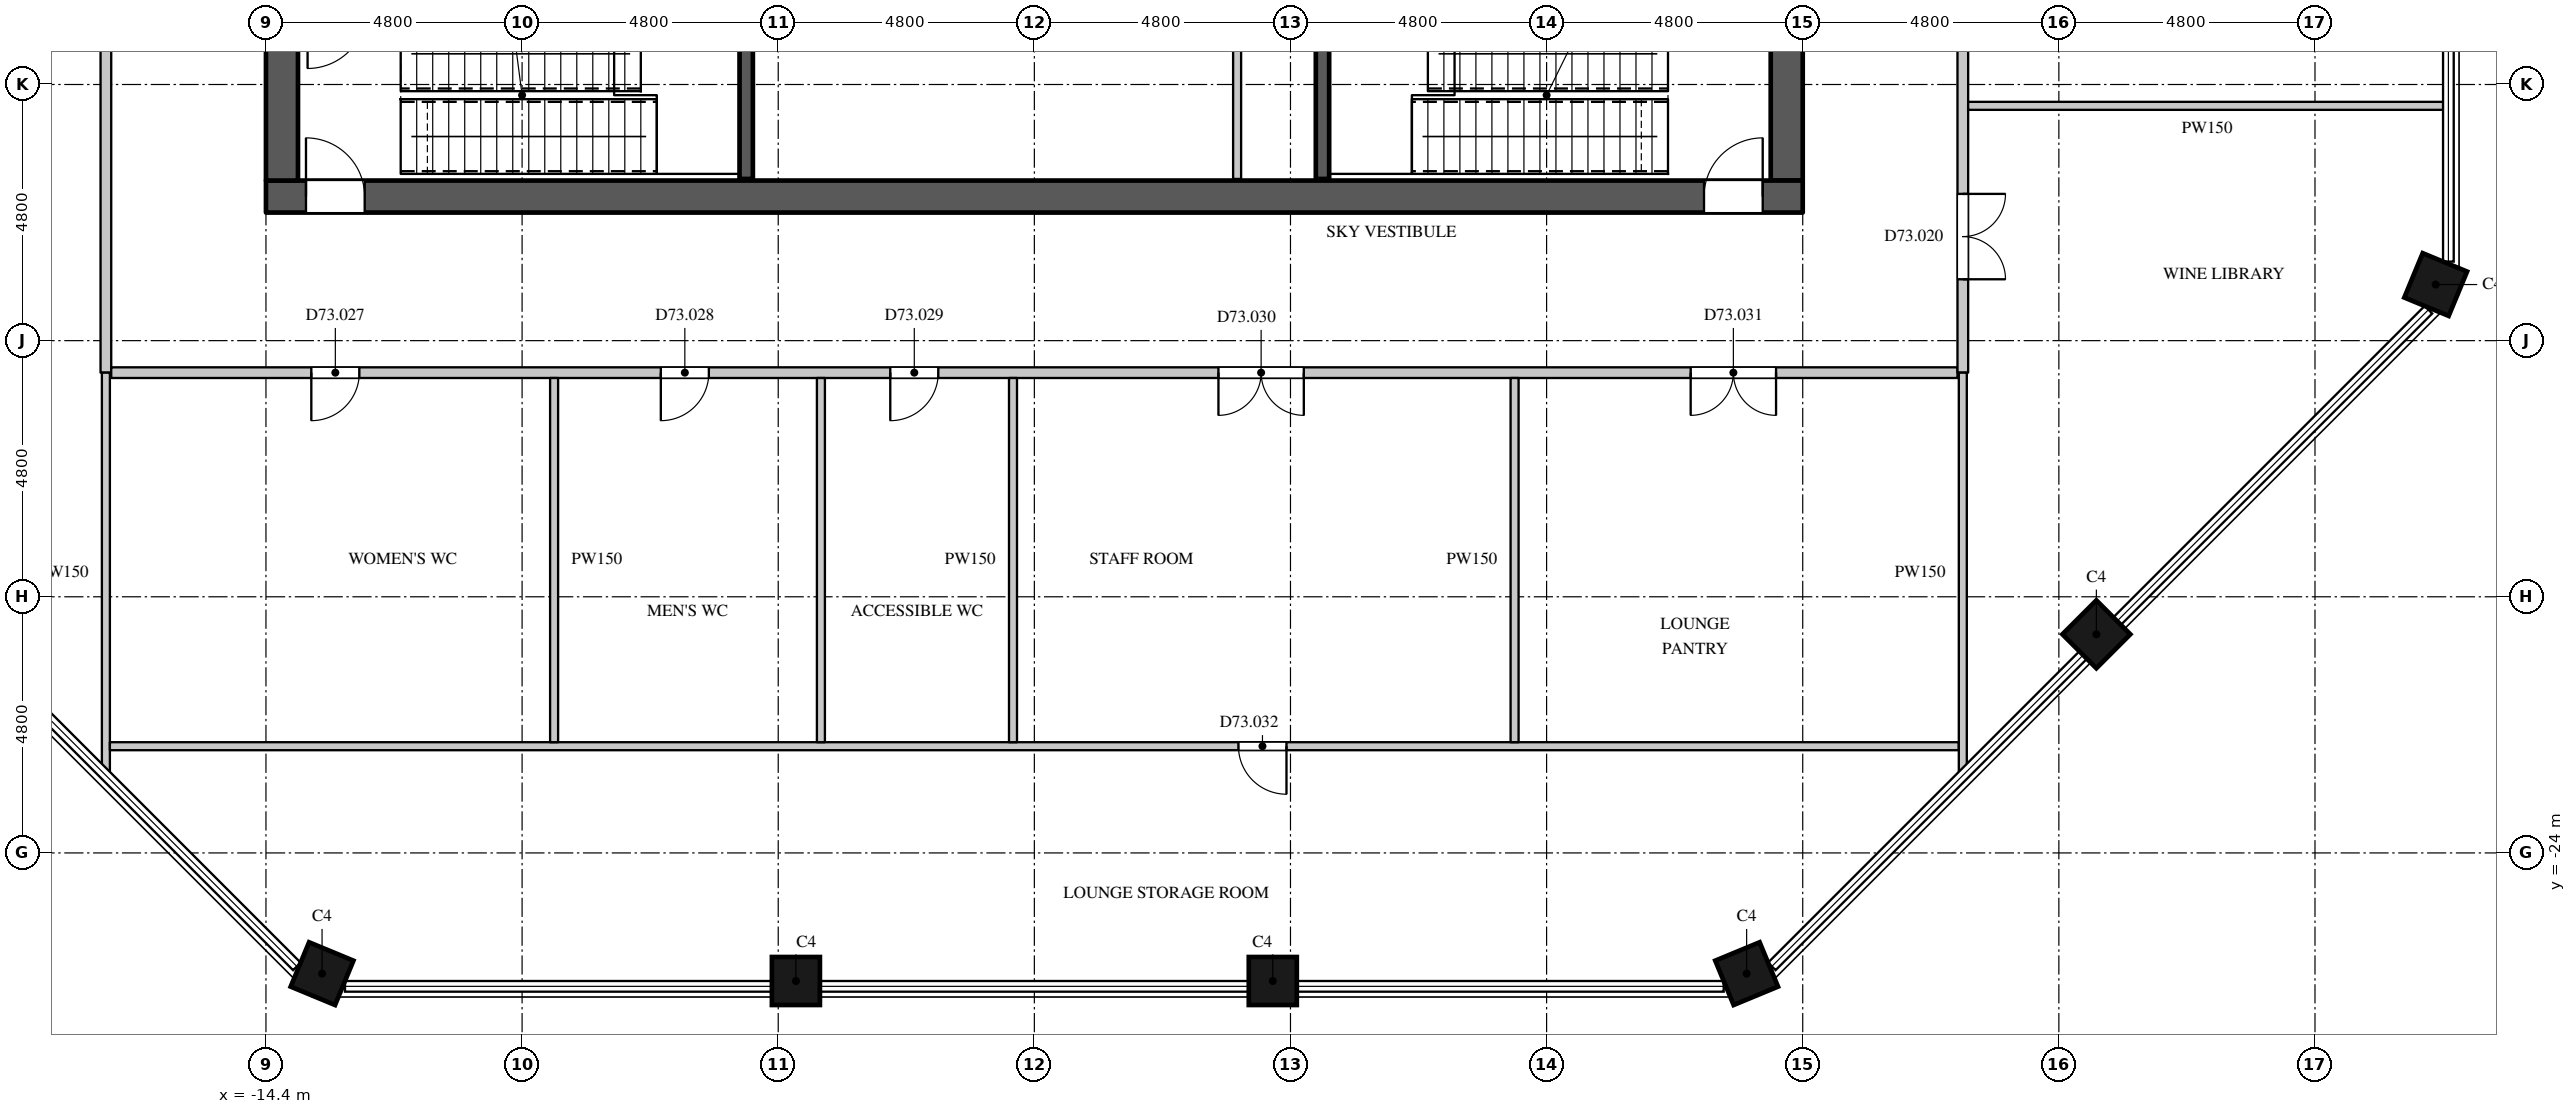
"""IFC4 building model, lengths in metres.
Left out: names, types, materials, properties, quantities, classifications, styles, units other than length and angle.
Written with IfcOpenShell. Run it as: python <this file> out.ifc"""

import sys

from ifc_helpers import new_model, si_unit, direction, frame, frame_2d, origin, origin_2d, place, context, subcontext, project, spatial, rectangle, extrude, element, fill, save


model = new_model("IFC4")
c1 = context("Model", 3, precision=1e-05, world=origin(), true_north=direction((0.0, 1.0)))
c2 = subcontext(c1, "Body", "Model", "MODEL_VIEW")
j1 = project(units=[si_unit("LENGTHUNIT", "METRE"), si_unit("PLANEANGLEUNIT", "RADIAN")], contexts=[c1])
p1 = place(None, origin())
s1 = spatial("IfcSite", under=j1, at=p1, CompositionType="ELEMENT")
p2 = place(p1, origin())
s2 = spatial("IfcBuilding", under=s1, at=p2, CompositionType="ELEMENT")
p3 = place(p2, frame((0.0, 0.0, 314.7)))
s3 = spatial("IfcBuildingStorey", under=s2, at=p3, CompositionType="ELEMENT", Elevation=314.7)
for number, where, z_axis, x_axis in (
    (1, (26.262, -13.349, 0.0), (0.0, 0.0, 1.0), (0.383, 0.924, 0.0)),
    (2, (-13.349, -26.262, 0.0), (0.0, 0.0, 1.0), (0.924, -0.383, 0.0)),
    (3, (-4.469, -26.4, 0.0), (0.0, 0.0, 1.0), (1.0, 0.0, 0.0)),
    (4, (4.469, -26.4, 0.0), (0.0, 0.0, 1.0), (1.0, 0.0, 0.0)),
    (5, (13.349, -26.262, 0.0), (0.0, 0.0, 1.0), (0.924, 0.383, 0.0)),
    (6, (19.903, -19.903, 0.0), (0.0, 0.0, 1.0), (0.707, 0.707, 0.0)),
):
    element("IfcColumn", number, at=place(p3, frame(where, z_axis=z_axis, x_axis=x_axis)), inside=s3, PredefinedType="COLUMN", context=c2, shape_type="SweptSolid", body=[
        extrude(rectangle(XDim=0.9, YDim=0.9, at=origin_2d()), origin(), (0.0, 0.0, 1.0), 5.4),
    ])
p4 = place(p3, frame((-14.4, -11.7, 0.0), z_axis=(0.0, 0.0, 1.0), x_axis=(1.0, 0.0, 0.0)))
e7 = element("IfcWall", 7, at=p4, inside=s3, PredefinedType="SHEAR", context=c2, shape_type="SweptSolid", body=[
    extrude(rectangle(XDim=28.8, YDim=0.6, at=frame_2d((14.4, 0.0))), origin(), (0.0, 0.0, 1.0), 5.4),
])
p5 = place(p4, frame((0.75, 0.0, 0.0)))
e8 = element("IfcOpeningElement", 8, at=p5, cuts=e7, PredefinedType="OPENING", context=c2, shape_type="SweptSolid", body=[
    extrude(rectangle(XDim=1.1, YDim=2.2, at=frame_2d((0.55, 1.1))), frame((0.0, 0.31, 0.0), z_axis=(0.0, -1.0, 0.0), x_axis=(1.0, 0.0, 0.0)), (0.0, 0.0, 1.0), 0.62),
])
p6 = place(p4, frame((26.95, 0.0, 0.0)))
e9 = element("IfcOpeningElement", 9, at=p6, cuts=e7, PredefinedType="OPENING", context=c2, shape_type="SweptSolid", body=[
    extrude(rectangle(XDim=1.1, YDim=2.2, at=frame_2d((0.55, 1.1))), frame((0.0, 0.31, 0.0), z_axis=(0.0, -1.0, 0.0), x_axis=(1.0, 0.0, 0.0)), (0.0, 0.0, 1.0), 0.62),
])
p7 = place(p3, frame((14.1, -11.4, 0.0), z_axis=(0.0, 0.0, 1.0), x_axis=(0.0, 1.0, 0.0)))
e10 = element("IfcWall", 10, at=p7, inside=s3, PredefinedType="SHEAR", context=c2, shape_type="SweptSolid", body=[
    extrude(rectangle(XDim=22.8, YDim=0.6, at=frame_2d((11.4, 0.0))), origin(), (0.0, 0.0, 1.0), 5.4),
])
p8 = place(p7, frame((6.35, 0.0, 0.0)))
e11 = element("IfcOpeningElement", 11, at=p8, cuts=e10, PredefinedType="OPENING", context=c2, shape_type="SweptSolid", body=[
    extrude(rectangle(XDim=1.5, YDim=2.4, at=frame_2d((0.75, 1.2))), frame((0.0, 0.31, 0.0), z_axis=(0.0, -1.0, 0.0), x_axis=(1.0, 0.0, 0.0)), (0.0, 0.0, 1.0), 0.62),
])
p9 = place(p3, frame((-14.1, -11.4, 0.0), z_axis=(0.0, 0.0, 1.0), x_axis=(0.0, 1.0, 0.0)))
e12 = element("IfcWall", 12, at=p9, inside=s3, PredefinedType="SHEAR", context=c2, shape_type="SweptSolid", body=[
    extrude(rectangle(XDim=22.8, YDim=0.6, at=frame_2d((11.4, 0.0))), origin(), (0.0, 0.0, 1.0), 5.4),
])
p10 = place(p9, frame((16.1, 0.0, 0.0)))
e13 = element("IfcOpeningElement", 13, at=p10, cuts=e12, PredefinedType="OPENING", context=c2, shape_type="SweptSolid", body=[
    extrude(rectangle(XDim=1.5, YDim=2.4, at=frame_2d((0.75, 1.2))), frame((0.0, 0.31, 0.0), z_axis=(0.0, -1.0, 0.0), x_axis=(1.0, 0.0, 0.0)), (0.0, 0.0, 1.0), 0.62),
])
p11 = place(p9, frame((5.1, 0.0, 0.0)))
e14 = element("IfcOpeningElement", 14, at=p11, cuts=e12, PredefinedType="OPENING", context=c2, shape_type="SweptSolid", body=[
    extrude(rectangle(XDim=1.5, YDim=2.4, at=frame_2d((0.75, 1.2))), frame((0.0, 0.31, 0.0), z_axis=(0.0, -1.0, 0.0), x_axis=(1.0, 0.0, 0.0)), (0.0, 0.0, 1.0), 0.62),
])
p12 = place(p3, frame((-17.4, -15.0, 0.0), z_axis=(0.0, 0.0, 1.0), x_axis=(0.0, 1.0, 0.0)))
e15 = element("IfcWall", 15, at=p12, inside=s3, PredefinedType="PARTITIONING", context=c2, shape_type="SweptSolid", body=[
    extrude(rectangle(XDim=30.0, YDim=0.2, at=frame_2d((15.0, 0.0))), origin(), (0.0, 0.0, 1.0), 5.1),
])
p13 = place(p12, frame((6.75, 0.0, 0.0)))
e16 = element("IfcOpeningElement", 16, at=p13, cuts=e15, PredefinedType="OPENING", context=c2, shape_type="SweptSolid", body=[
    extrude(rectangle(XDim=1.6, YDim=2.4, at=frame_2d((0.8, 1.2))), frame((0.0, 0.11, 0.0), z_axis=(0.0, -1.0, 0.0), x_axis=(1.0, 0.0, 0.0)), (0.0, 0.0, 1.0), 0.22),
])
p14 = place(p12, frame((21.6, 0.0, 0.0)))
e17 = element("IfcOpeningElement", 17, at=p14, cuts=e15, PredefinedType="OPENING", context=c2, shape_type="SweptSolid", body=[
    extrude(rectangle(XDim=1.6, YDim=2.4, at=frame_2d((0.8, 1.2))), frame((0.0, 0.11, 0.0), z_axis=(0.0, -1.0, 0.0), x_axis=(1.0, 0.0, 0.0)), (0.0, 0.0, 1.0), 0.22),
])
p15 = place(p3, frame((-17.3, -15.0, 0.0), z_axis=(0.0, 0.0, 1.0), x_axis=(1.0, 0.0, 0.0)))
e18 = element("IfcWall", 18, at=p15, inside=s3, PredefinedType="PARTITIONING", context=c2, shape_type="SweptSolid", body=[
    extrude(rectangle(XDim=34.6, YDim=0.2, at=frame_2d((17.3, 0.0))), origin(), (0.0, 0.0, 1.0), 5.1),
])
p16 = place(p15, frame((3.75, 0.0, 0.0)))
e19 = element("IfcOpeningElement", 19, at=p16, cuts=e18, PredefinedType="OPENING", context=c2, shape_type="SweptSolid", body=[
    extrude(rectangle(XDim=0.9, YDim=2.2, at=frame_2d((0.45, 1.1))), frame((0.0, 0.11, 0.0), z_axis=(0.0, -1.0, 0.0), x_axis=(1.0, 0.0, 0.0)), (0.0, 0.0, 1.0), 0.22),
])
p17 = place(p15, frame((10.3, 0.0, 0.0)))
e20 = element("IfcOpeningElement", 20, at=p17, cuts=e18, PredefinedType="OPENING", context=c2, shape_type="SweptSolid", body=[
    extrude(rectangle(XDim=0.9, YDim=2.2, at=frame_2d((0.45, 1.1))), frame((0.0, 0.11, 0.0), z_axis=(0.0, -1.0, 0.0), x_axis=(1.0, 0.0, 0.0)), (0.0, 0.0, 1.0), 0.22),
])
p18 = place(p15, frame((14.6, 0.0, 0.0)))
e21 = element("IfcOpeningElement", 21, at=p18, cuts=e18, PredefinedType="OPENING", context=c2, shape_type="SweptSolid", body=[
    extrude(rectangle(XDim=0.9, YDim=2.2, at=frame_2d((0.45, 1.1))), frame((0.0, 0.11, 0.0), z_axis=(0.0, -1.0, 0.0), x_axis=(1.0, 0.0, 0.0)), (0.0, 0.0, 1.0), 0.22),
])
p19 = place(p15, frame((20.75, 0.0, 0.0)))
e22 = element("IfcOpeningElement", 22, at=p19, cuts=e18, PredefinedType="OPENING", context=c2, shape_type="SweptSolid", body=[
    extrude(rectangle(XDim=1.6, YDim=2.4, at=frame_2d((0.8, 1.2))), frame((0.0, 0.11, 0.0), z_axis=(0.0, -1.0, 0.0), x_axis=(1.0, 0.0, 0.0)), (0.0, 0.0, 1.0), 0.22),
])
p20 = place(p15, frame((29.6, 0.0, 0.0)))
e23 = element("IfcOpeningElement", 23, at=p20, cuts=e18, PredefinedType="OPENING", context=c2, shape_type="SweptSolid", body=[
    extrude(rectangle(XDim=1.6, YDim=2.4, at=frame_2d((0.8, 1.2))), frame((0.0, 0.11, 0.0), z_axis=(0.0, -1.0, 0.0), x_axis=(1.0, 0.0, 0.0)), (0.0, 0.0, 1.0), 0.22),
])
p21 = place(p3, frame((17.4, -15.0, 0.0), z_axis=(0.0, 0.0, 1.0), x_axis=(0.0, 1.0, 0.0)))
e24 = element("IfcWall", 24, at=p21, inside=s3, PredefinedType="PARTITIONING", context=c2, shape_type="SweptSolid", body=[
    extrude(rectangle(XDim=30.0, YDim=0.2, at=frame_2d((15.0, 0.0))), origin(), (0.0, 0.0, 1.0), 5.1),
])
p22 = place(p21, frame((14.2, 0.0, 0.0)))
e25 = element("IfcOpeningElement", 25, at=p22, cuts=e24, PredefinedType="OPENING", context=c2, shape_type="SweptSolid", body=[
    extrude(rectangle(XDim=1.6, YDim=2.4, at=frame_2d((0.8, 1.2))), frame((0.0, 0.11, 0.0), z_axis=(0.0, -1.0, 0.0), x_axis=(1.0, 0.0, 0.0)), (0.0, 0.0, 1.0), 0.22),
])
p23 = place(p21, frame((26.65, 0.0, 0.0)))
e26 = element("IfcOpeningElement", 26, at=p23, cuts=e24, PredefinedType="OPENING", context=c2, shape_type="SweptSolid", body=[
    extrude(rectangle(XDim=1.6, YDim=2.4, at=frame_2d((0.8, 1.2))), frame((0.0, 0.11, 0.0), z_axis=(0.0, -1.0, 0.0), x_axis=(1.0, 0.0, 0.0)), (0.0, 0.0, 1.0), 0.22),
])
p24 = place(p21, frame((1.75, 0.0, 0.0)))
e27 = element("IfcOpeningElement", 27, at=p24, cuts=e24, PredefinedType="OPENING", context=c2, shape_type="SweptSolid", body=[
    extrude(rectangle(XDim=1.6, YDim=2.4, at=frame_2d((0.8, 1.2))), frame((0.0, 0.11, 0.0), z_axis=(0.0, -1.0, 0.0), x_axis=(1.0, 0.0, 0.0)), (0.0, 0.0, 1.0), 0.22),
])
p25 = place(p3, frame((-17.4, -22.484, 0.0), z_axis=(0.0, 0.0, 1.0), x_axis=(0.0, 1.0, 0.0)))
e28 = element("IfcWall", 28, at=p25, inside=s3, PredefinedType="PARTITIONING", context=c2, shape_type="SweptSolid", body=[
    extrude(rectangle(XDim=7.484, YDim=0.15, at=frame_2d((3.742, 0.0))), origin(), (0.0, 0.0, 1.0), 5.1),
])
p26 = place(p3, frame((-17.325, -22.0, 0.0), z_axis=(0.0, 0.0, 1.0), x_axis=(1.0, 0.0, 0.0)))
e29 = element("IfcWall", 29, at=p26, inside=s3, PredefinedType="PARTITIONING", context=c2, shape_type="SweptSolid", body=[
    extrude(rectangle(XDim=34.65, YDim=0.15, at=frame_2d((17.325, 0.0))), origin(), (0.0, 0.0, 1.0), 5.1),
])
p27 = place(p26, frame((21.15, 0.0, 0.0)))
e30 = element("IfcOpeningElement", 30, at=p27, cuts=e29, PredefinedType="OPENING", context=c2, shape_type="SweptSolid", body=[
    extrude(rectangle(XDim=0.9, YDim=2.2, at=frame_2d((0.45, 1.1))), frame((0.0, 0.085, 0.0), z_axis=(0.0, -1.0, 0.0), x_axis=(1.0, 0.0, 0.0)), (0.0, 0.0, 1.0), 0.17),
])
for number, where, z_axis, x_axis in (
    (31, (-9.0, -21.925, 0.0), (0.0, 0.0, 1.0), (0.0, 1.0, 0.0)),
    (32, (-4.0, -21.925, 0.0), (0.0, 0.0, 1.0), (0.0, 1.0, 0.0)),
    (33, (-0.4, -21.925, 0.0), (0.0, 0.0, 1.0), (0.0, 1.0, 0.0)),
):
    element("IfcWall", number, at=place(p3, frame(where, z_axis=z_axis, x_axis=x_axis)), inside=s3, PredefinedType="PARTITIONING", context=c2, shape_type="SweptSolid", body=[
        extrude(rectangle(XDim=6.825, YDim=0.15, at=frame_2d((3.413, 0.0))), origin(), (0.0, 0.0, 1.0), 5.1),
    ])
p28 = place(p3, frame((3.8, -11.37, 0.0), z_axis=(0.0, 0.0, 1.0), x_axis=(0.0, 1.0, 0.0)))
e34 = element("IfcWall", 34, at=p28, inside=s3, PredefinedType="PARTITIONING", context=c2, shape_type="SweptSolid", body=[
    extrude(rectangle(XDim=5.47, YDim=0.15, at=frame_2d((2.735, 0.0))), origin(), (0.0, 0.0, 1.0), 5.1),
])
p29 = place(p3, frame((9.0, -21.925, 0.0), z_axis=(0.0, 0.0, 1.0), x_axis=(0.0, 1.0, 0.0)))
e35 = element("IfcWall", 35, at=p29, inside=s3, PredefinedType="PARTITIONING", context=c2, shape_type="SweptSolid", body=[
    extrude(rectangle(XDim=6.825, YDim=0.15, at=frame_2d((3.413, 0.0))), origin(), (0.0, 0.0, 1.0), 5.1),
])
p30 = place(p3, frame((17.4, -22.484, 0.0), z_axis=(0.0, 0.0, 1.0), x_axis=(0.0, 1.0, 0.0)))
e36 = element("IfcWall", 36, at=p30, inside=s3, PredefinedType="PARTITIONING", context=c2, shape_type="SweptSolid", body=[
    extrude(rectangle(XDim=7.484, YDim=0.15, at=frame_2d((3.742, 0.0))), origin(), (0.0, 0.0, 1.0), 5.1),
])
p31 = place(p3, frame((17.5, -10.0, 0.0), z_axis=(0.0, 0.0, 1.0), x_axis=(1.0, 0.0, 0.0)))
e37 = element("IfcWall", 37, at=p31, inside=s3, PredefinedType="PARTITIONING", context=c2, shape_type="SweptSolid", body=[
    extrude(rectangle(XDim=8.955, YDim=0.15, at=frame_2d((4.478, 0.0))), origin(), (0.0, 0.0, 1.0), 5.1),
])
for number, where, z_axis, x_axis in (
    (38, (-5.4, -11.37, 0.0), (0.0, 0.0, 1.0), (0.0, 1.0, 0.0)),
    (39, (5.4, -11.37, 0.0), (0.0, 0.0, 1.0), (0.0, 1.0, 0.0)),
):
    element("IfcWall", number, at=place(p3, frame(where, z_axis=z_axis, x_axis=x_axis)), inside=s3, PredefinedType="SHEAR", context=c2, shape_type="SweptSolid", body=[
        extrude(rectangle(XDim=3.045, YDim=0.25, at=frame_2d((1.522, 0.0))), origin(), (0.0, 0.0, 1.0), 5.1),
    ])
p32 = place(p24, origin())
e40 = element("IfcDoor", 40, at=p32, inside=s3, OperationType="DOUBLE_DOOR_SINGLE_SWING", PredefinedType="DOOR", context=c2, shape_type="SweptSolid", body=[
    extrude(rectangle(XDim=1.6, YDim=2.4, at=frame_2d((0.8, 1.2))), frame((0.0, 0.025, 0.0), z_axis=(0.0, -1.0, 0.0), x_axis=(1.0, 0.0, 0.0)), (0.0, 0.0, 1.0), 0.05),
])
fill(e27, e40)
p33 = place(p16, origin())
e41 = element("IfcDoor", 41, at=p33, inside=s3, OperationType="SINGLE_SWING_RIGHT", PredefinedType="DOOR", context=c2, shape_type="SweptSolid", body=[
    extrude(rectangle(XDim=0.9, YDim=2.2, at=frame_2d((0.45, 1.1))), frame((0.0, 0.025, 0.0), z_axis=(0.0, -1.0, 0.0), x_axis=(1.0, 0.0, 0.0)), (0.0, 0.0, 1.0), 0.05),
])
fill(e19, e41)
p34 = place(p17, origin())
e42 = element("IfcDoor", 42, at=p34, inside=s3, OperationType="SINGLE_SWING_RIGHT", PredefinedType="DOOR", context=c2, shape_type="SweptSolid", body=[
    extrude(rectangle(XDim=0.9, YDim=2.2, at=frame_2d((0.45, 1.1))), frame((0.0, 0.025, 0.0), z_axis=(0.0, -1.0, 0.0), x_axis=(1.0, 0.0, 0.0)), (0.0, 0.0, 1.0), 0.05),
])
fill(e20, e42)
p35 = place(p18, origin())
e43 = element("IfcDoor", 43, at=p35, inside=s3, OperationType="SINGLE_SWING_RIGHT", PredefinedType="DOOR", context=c2, shape_type="SweptSolid", body=[
    extrude(rectangle(XDim=0.9, YDim=2.2, at=frame_2d((0.45, 1.1))), frame((0.0, 0.025, 0.0), z_axis=(0.0, -1.0, 0.0), x_axis=(1.0, 0.0, 0.0)), (0.0, 0.0, 1.0), 0.05),
])
fill(e21, e43)
p36 = place(p19, origin())
e44 = element("IfcDoor", 44, at=p36, inside=s3, OperationType="DOUBLE_DOOR_SINGLE_SWING", PredefinedType="DOOR", context=c2, shape_type="SweptSolid", body=[
    extrude(rectangle(XDim=1.6, YDim=2.4, at=frame_2d((0.8, 1.2))), frame((0.0, 0.025, 0.0), z_axis=(0.0, -1.0, 0.0), x_axis=(1.0, 0.0, 0.0)), (0.0, 0.0, 1.0), 0.05),
])
fill(e22, e44)
p37 = place(p20, origin())
e45 = element("IfcDoor", 45, at=p37, inside=s3, OperationType="DOUBLE_DOOR_SINGLE_SWING", PredefinedType="DOOR", context=c2, shape_type="SweptSolid", body=[
    extrude(rectangle(XDim=1.6, YDim=2.4, at=frame_2d((0.8, 1.2))), frame((0.0, 0.025, 0.0), z_axis=(0.0, -1.0, 0.0), x_axis=(1.0, 0.0, 0.0)), (0.0, 0.0, 1.0), 0.05),
])
fill(e23, e45)
p38 = place(p27, origin())
e46 = element("IfcDoor", 46, at=p38, inside=s3, OperationType="SINGLE_SWING_LEFT", PredefinedType="DOOR", context=c2, shape_type="SweptSolid", body=[
    extrude(rectangle(XDim=0.9, YDim=2.2, at=frame_2d((0.45, 1.1))), frame((0.0, 0.025, 0.0), z_axis=(0.0, -1.0, 0.0), x_axis=(1.0, 0.0, 0.0)), (0.0, 0.0, 1.0), 0.05),
])
fill(e30, e46)
p39 = place(p5, origin())
e47 = element("IfcDoor", 47, at=p39, inside=s3, OperationType="SINGLE_SWING_LEFT", PredefinedType="DOOR", context=c2, shape_type="SweptSolid", body=[
    extrude(rectangle(XDim=1.1, YDim=2.2, at=frame_2d((0.55, 1.1))), frame((0.0, 0.295, 0.0), z_axis=(0.0, -1.0, 0.0), x_axis=(1.0, 0.0, 0.0)), (0.0, 0.0, 1.0), 0.05),
])
fill(e8, e47)
p40 = place(p6, origin())
e48 = element("IfcDoor", 48, at=p40, inside=s3, OperationType="SINGLE_SWING_RIGHT", PredefinedType="DOOR", context=c2, shape_type="SweptSolid", body=[
    extrude(rectangle(XDim=1.1, YDim=2.2, at=frame_2d((0.55, 1.1))), frame((0.0, 0.295, 0.0), z_axis=(0.0, -1.0, 0.0), x_axis=(1.0, 0.0, 0.0)), (0.0, 0.0, 1.0), 0.05),
])
fill(e9, e48)
save(model, sys.argv[1])
